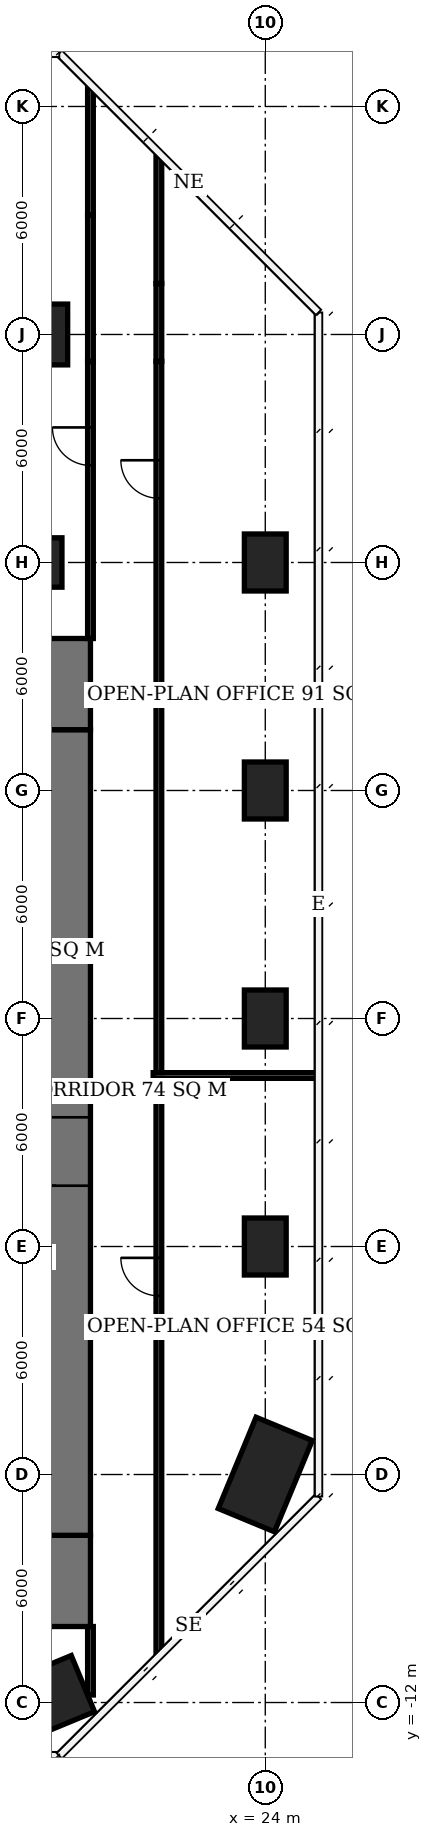
"""IFC4 building model, lengths in metres.
Left out: names, types, materials, properties, quantities, classifications, styles, units other than length and angle.
Written with IfcOpenShell. Run it as: python <this file> out.ifc"""

import sys

from ifc_helpers import new_model, si_unit, direction, frame, frame_2d, origin, origin_2d, place, context, subcontext, project, spatial, rectangle, extrude, element, fill, save


model = new_model("IFC4")
c1 = context("Model", 3, precision=1e-05, world=origin(), true_north=direction((0.0, 1.0)))
c2 = subcontext(c1, "Body", "Model", "MODEL_VIEW")
j1 = project(units=[si_unit("LENGTHUNIT", "METRE"), si_unit("PLANEANGLEUNIT", "RADIAN")], contexts=[c1])
p1 = place(None, origin())
s1 = spatial("IfcSite", under=j1, at=p1, CompositionType="ELEMENT")
p2 = place(p1, origin())
s2 = spatial("IfcBuilding", under=s1, at=p2, CompositionType="ELEMENT")
p3 = place(p2, frame((0.0, 0.0, 200.6)))
s3 = spatial("IfcBuildingStorey", under=s2, at=p3, CompositionType="ELEMENT", Elevation=200.6)
p4 = place(p3, frame((18.0, -12.0, 0.0), z_axis=(0.0, 0.0, 1.0), x_axis=(-0.923879532511, -0.382683432365, 0.0)))
e1 = element("IfcColumn", 1, at=p4, inside=s3, PredefinedType="COLUMN", context=c2, shape_type="SweptSolid", body=[
    extrude(rectangle(XDim=2.6, YDim=1.6, at=origin_2d()), origin(), (0.0, 0.0, 1.0), 3.9),
])
p5 = place(p3, frame((18.0, 18.0, 0.0), z_axis=(0.0, 0.0, 1.0), x_axis=(1.0, 0.0, 0.0)))
e2 = element("IfcColumn", 2, at=p5, inside=s3, PredefinedType="COLUMN", context=c2, shape_type="SweptSolid", body=[
    extrude(rectangle(XDim=1.3, YDim=1.3, at=origin_2d()), origin(), (0.0, 0.0, 1.0), 3.9),
])
p6 = place(p3, frame((18.0, 24.0, 0.0), z_axis=(0.0, 0.0, 1.0), x_axis=(1.0, 0.0, 0.0)))
e3 = element("IfcColumn", 3, at=p6, inside=s3, PredefinedType="COLUMN", context=c2, shape_type="SweptSolid", body=[
    extrude(rectangle(XDim=1.6, YDim=1.6, at=origin_2d()), origin(), (0.0, 0.0, 1.0), 3.9),
])
p7 = place(p3, frame((24.0, -6.0, 0.0), z_axis=(0.0, 0.0, 1.0), x_axis=(-0.382683432365, -0.923879532511, 0.0)))
e4 = element("IfcColumn", 4, at=p7, inside=s3, PredefinedType="COLUMN", context=c2, shape_type="SweptSolid", body=[
    extrude(rectangle(XDim=2.6, YDim=1.6, at=origin_2d()), origin(), (0.0, 0.0, 1.0), 3.9),
])
for number, where, z_axis, x_axis in (
    (5, (24.0, 0.0, 0.0), (0.0, 0.0, 1.0), (0.0, 1.0, 0.0)),
    (6, (24.0, 6.0, 0.0), (0.0, 0.0, 1.0), (0.0, 1.0, 0.0)),
    (7, (24.0, 12.0, 0.0), (0.0, 0.0, 1.0), (0.0, 1.0, 0.0)),
    (8, (24.0, 18.0, 0.0), (0.0, 0.0, 1.0), (0.0, 1.0, 0.0)),
):
    element("IfcColumn", number, at=place(p3, frame(where, z_axis=z_axis, x_axis=x_axis)), inside=s3, PredefinedType="COLUMN", context=c2, shape_type="SweptSolid", body=[
        extrude(rectangle(XDim=1.5, YDim=1.1, at=origin_2d()), origin(), (0.0, 0.0, 1.0), 3.9),
    ])
p8 = place(p3, frame((18.5, -7.6, 0.0), z_axis=(0.0, 0.0, 1.0), x_axis=(0.0, 1.0, 0.0)))
e9 = element("IfcWall", 9, at=p8, inside=s3, PredefinedType="SHEAR", context=c2, shape_type="SweptSolid", body=[
    extrude(rectangle(XDim=21.2, YDim=1.8, at=frame_2d((10.6, 0.0))), origin(), (0.0, 0.0, 1.0), 3.9),
])
p9 = place(p8, frame((9.2, 0.0, 0.0)))
e10 = element("IfcOpeningElement", 10, at=p9, cuts=e9, PredefinedType="OPENING", context=c2, shape_type="SweptSolid", body=[
    extrude(rectangle(XDim=1.8, YDim=2.4, at=frame_2d((0.9, 1.2))), frame((0.0, 0.91, 0.0), z_axis=(0.0, -1.0, 0.0), x_axis=(1.0, 0.0, 0.0)), (0.0, 0.0, 1.0), 1.82),
])
for number, where, z_axis, x_axis in (
    (11, (18.5, -10.0, 0.0), (0.0, 0.0, 1.0), (0.0, 1.0, 0.0)),
    (12, (18.5, 13.6, 0.0), (0.0, 0.0, 1.0), (0.0, 1.0, 0.0)),
):
    element("IfcWall", number, at=place(p3, frame(where, z_axis=z_axis, x_axis=x_axis)), inside=s3, PredefinedType="SHEAR", context=c2, shape_type="SweptSolid", body=[
        extrude(rectangle(XDim=2.4, YDim=1.8, at=frame_2d((1.2, 0.0))), origin(), (0.0, 0.0, 1.0), 3.9),
    ])
p10 = place(p3, frame((19.4, -11.802, 0.0), z_axis=(0.0, 0.0, 1.0), x_axis=(0.0, 1.0, 0.0)))
e13 = element("IfcWall", 13, at=p10, inside=s3, PredefinedType="PARTITIONING", context=c2, shape_type="SweptSolid", body=[
    extrude(rectangle(XDim=1.802, YDim=0.15, at=frame_2d((0.901, 0.0))), origin(), (0.0, 0.0, 1.0), 3.65),
])
p11 = place(p3, frame((19.4, 16.0, 0.0), z_axis=(0.0, 0.0, 1.0), x_axis=(0.0, 1.0, 0.0)))
e14 = element("IfcWall", 14, at=p11, inside=s3, PredefinedType="PARTITIONING", context=c2, shape_type="SweptSolid", body=[
    extrude(rectangle(XDim=7.29, YDim=0.15, at=frame_2d((3.645, 0.0))), origin(), (0.0, 0.0, 1.0), 3.65),
])
p12 = place(p11, frame((4.554, 0.0, 0.0)))
e15 = element("IfcOpeningElement", 15, at=p12, cuts=e14, PredefinedType="OPENING", context=c2, shape_type="SweptSolid", body=[
    extrude(rectangle(XDim=1.0, YDim=2.1, at=frame_2d((0.5, 1.05))), frame((0.0, 0.085, 0.0), z_axis=(0.0, -1.0, 0.0), x_axis=(1.0, 0.0, 0.0)), (0.0, 0.0, 1.0), 0.17),
])
p13 = place(p3, frame((19.4, 23.29, 0.0), z_axis=(0.0, 0.0, 1.0), x_axis=(0.0, 1.0, 0.0)))
e16 = element("IfcWall", 16, at=p13, inside=s3, PredefinedType="PARTITIONING", context=c2, shape_type="SweptSolid", body=[
    extrude(rectangle(XDim=3.85, YDim=0.15, at=frame_2d((1.925, 0.0))), origin(), (0.0, 0.0, 1.0), 2.65),
])
p14 = place(p3, frame((19.4, 27.14, 0.0), z_axis=(0.0, 0.0, 1.0), x_axis=(0.0, 1.0, 0.0)))
e17 = element("IfcWall", 17, at=p14, inside=s3, PredefinedType="PARTITIONING", context=c2, shape_type="SweptSolid", body=[
    extrude(rectangle(XDim=3.349, YDim=0.15, at=frame_2d((1.675, 0.0))), origin(), (0.0, 0.0, 1.0), 3.65),
])
p15 = place(p3, frame((21.2, -10.689, 0.0), z_axis=(0.0, 0.0, 1.0), x_axis=(0.0, 1.0, 0.0)))
e18 = element("IfcWall", 18, at=p15, inside=s3, PredefinedType="PARTITIONING", context=c2, shape_type="SweptSolid", body=[
    extrude(rectangle(XDim=15.114, YDim=0.15, at=frame_2d((7.557, 0.0))), origin(), (0.0, 0.0, 1.0), 3.65),
])
p16 = place(p15, frame((9.39, 0.0, 0.0)))
e19 = element("IfcOpeningElement", 19, at=p16, cuts=e18, PredefinedType="OPENING", context=c2, shape_type="SweptSolid", body=[
    extrude(rectangle(XDim=1.0, YDim=2.1, at=frame_2d((0.5, 1.05))), frame((0.0, 0.085, 0.0), z_axis=(0.0, -1.0, 0.0), x_axis=(1.0, 0.0, 0.0)), (0.0, 0.0, 1.0), 0.17),
])
p17 = place(p3, frame((21.2, 4.575, 0.0), z_axis=(0.0, 0.0, 1.0), x_axis=(0.0, 1.0, 0.0)))
e20 = element("IfcWall", 20, at=p17, inside=s3, PredefinedType="PARTITIONING", context=c2, shape_type="SweptSolid", body=[
    extrude(rectangle(XDim=18.715, YDim=0.15, at=frame_2d((9.357, 0.0))), origin(), (0.0, 0.0, 1.0), 3.65),
])
p18 = place(p17, frame((15.115, 0.0, 0.0)))
e21 = element("IfcOpeningElement", 21, at=p18, cuts=e20, PredefinedType="OPENING", context=c2, shape_type="SweptSolid", body=[
    extrude(rectangle(XDim=1.0, YDim=2.1, at=frame_2d((0.5, 1.05))), frame((0.0, 0.085, 0.0), z_axis=(0.0, -1.0, 0.0), x_axis=(1.0, 0.0, 0.0)), (0.0, 0.0, 1.0), 0.17),
])
p19 = place(p3, frame((21.2, 23.29, 0.0), z_axis=(0.0, 0.0, 1.0), x_axis=(0.0, 1.0, 0.0)))
e22 = element("IfcWall", 22, at=p19, inside=s3, PredefinedType="PARTITIONING", context=c2, shape_type="SweptSolid", body=[
    extrude(rectangle(XDim=2.05, YDim=0.15, at=frame_2d((1.025, 0.0))), origin(), (0.0, 0.0, 1.0), 2.65),
])
p20 = place(p3, frame((21.2, 25.34, 0.0), z_axis=(0.0, 0.0, 1.0), x_axis=(0.0, 1.0, 0.0)))
e23 = element("IfcWall", 23, at=p20, inside=s3, PredefinedType="PARTITIONING", context=c2, shape_type="SweptSolid", body=[
    extrude(rectangle(XDim=3.349, YDim=0.15, at=frame_2d((1.674, 0.0))), origin(), (0.0, 0.0, 1.0), 3.65),
])
p21 = place(p3, frame((21.05, 4.5, 0.0), z_axis=(0.0, 0.0, 1.0), x_axis=(1.0, 0.0, 0.0)))
e24 = element("IfcWall", 24, at=p21, inside=s3, PredefinedType="PARTITIONING", context=c2, shape_type="SweptSolid", body=[
    extrude(rectangle(XDim=4.35, YDim=0.15, at=frame_2d((2.175, 0.0))), origin(), (0.0, 0.0, 1.0), 3.65),
])
p22 = place(p9, origin())
e25 = element("IfcDoor", 25, at=p22, inside=s3, OperationType="DOUBLE_DOOR_SINGLE_SWING", PredefinedType="DOOR", context=c2, shape_type="SweptSolid", body=[
    extrude(rectangle(XDim=1.8, YDim=2.4, at=frame_2d((0.9, 1.2))), frame((0.0, 0.025, 0.0), z_axis=(0.0, -1.0, 0.0), x_axis=(1.0, 0.0, 0.0)), (0.0, 0.0, 1.0), 0.05),
])
fill(e10, e25)
p23 = place(p16, origin())
e26 = element("IfcDoor", 26, at=p23, inside=s3, OperationType="SINGLE_SWING_RIGHT", PredefinedType="DOOR", context=c2, shape_type="SweptSolid", body=[
    extrude(rectangle(XDim=1.0, YDim=2.1, at=frame_2d((0.5, 1.05))), frame((0.0, 0.025, 0.0), z_axis=(0.0, -1.0, 0.0), x_axis=(1.0, 0.0, 0.0)), (0.0, 0.0, 1.0), 0.05),
])
fill(e19, e26)
p24 = place(p18, origin())
e27 = element("IfcDoor", 27, at=p24, inside=s3, OperationType="SINGLE_SWING_RIGHT", PredefinedType="DOOR", context=c2, shape_type="SweptSolid", body=[
    extrude(rectangle(XDim=1.0, YDim=2.1, at=frame_2d((0.5, 1.05))), frame((0.0, 0.025, 0.0), z_axis=(0.0, -1.0, 0.0), x_axis=(1.0, 0.0, 0.0)), (0.0, 0.0, 1.0), 0.05),
])
fill(e21, e27)
p25 = place(p12, origin())
e28 = element("IfcDoor", 28, at=p25, inside=s3, OperationType="SINGLE_SWING_RIGHT", PredefinedType="DOOR", context=c2, shape_type="SweptSolid", body=[
    extrude(rectangle(XDim=1.0, YDim=2.1, at=frame_2d((0.5, 1.05))), frame((0.0, 0.025, 0.0), z_axis=(0.0, -1.0, 0.0), x_axis=(1.0, 0.0, 0.0)), (0.0, 0.0, 1.0), 0.05),
])
fill(e15, e28)
save(model, sys.argv[1])
